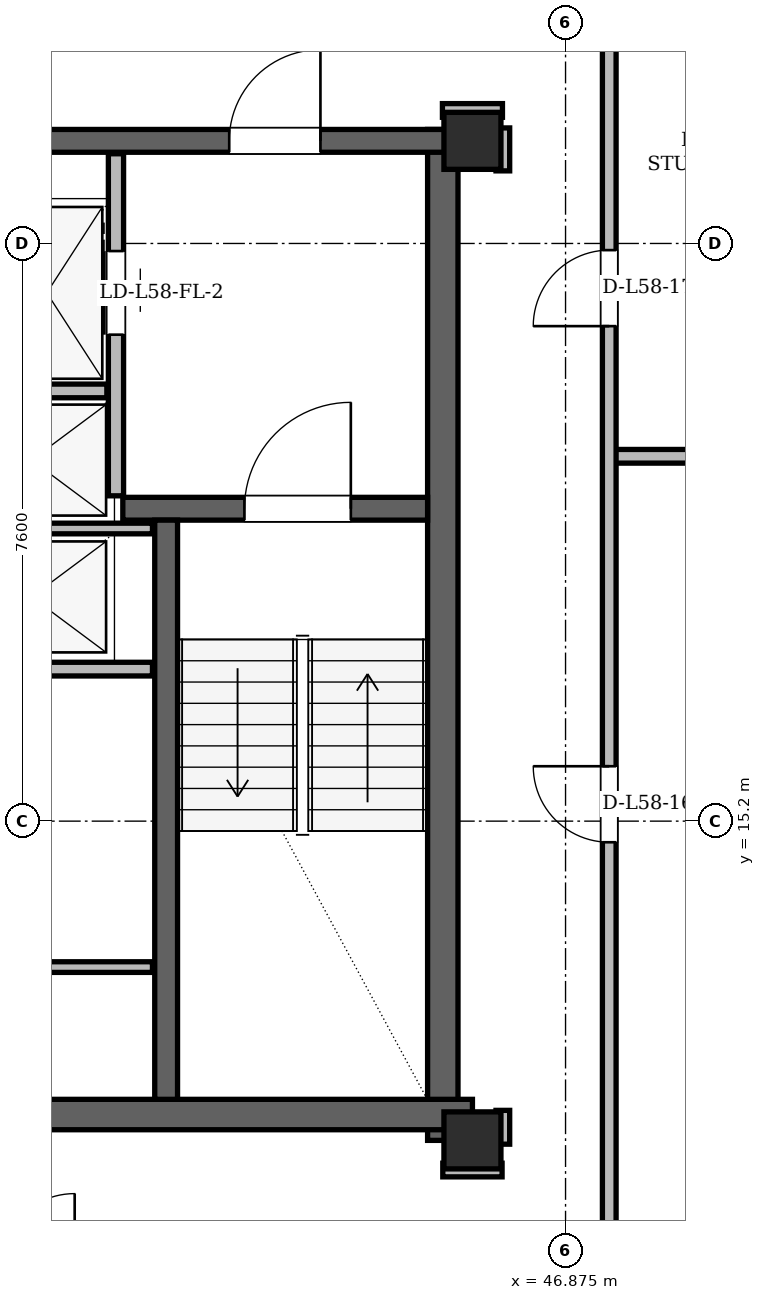
"""IFC4 building model, lengths in metres.
Left out: names, types, materials, properties, quantities, classifications, styles, units other than length and angle.
Written with IfcOpenShell. Run it as: python <this file> out.ifc"""

import sys

from ifc_helpers import new_model, si_unit, direction, frame, frame_2d, origin, origin_2d, place, context, subcontext, project, spatial, rectangle, hollow_rectangle, extrude, element, fill, save


model = new_model("IFC4")
c1 = context("Model", 3, precision=1e-05, world=origin(), true_north=direction((0.0, 1.0)))
c2 = subcontext(c1, "Body", "Model", "MODEL_VIEW")
j1 = project(units=[si_unit("LENGTHUNIT", "METRE"), si_unit("PLANEANGLEUNIT", "RADIAN")], contexts=[c1])
p1 = place(None, origin())
s1 = spatial("IfcSite", under=j1, at=p1, CompositionType="ELEMENT")
p2 = place(p1, origin())
s2 = spatial("IfcBuilding", under=s1, at=p2, CompositionType="ELEMENT")
p3 = place(p2, frame((0.0, 0.0, 219.9)))
s3 = spatial("IfcBuildingStorey", under=s2, at=p3, CompositionType="ELEMENT", Elevation=219.9)
for number, where, z_axis, x_axis in (
    (1, (45.65, 11.0, 0.0), (0.0, 0.0, 1.0), (1.0, 0.0, 0.0)),
    (2, (45.65, 24.15, 0.0), (0.0, 0.0, 1.0), (1.0, 0.0, 0.0)),
):
    element("IfcColumn", number, at=place(p3, frame(where, z_axis=z_axis, x_axis=x_axis)), inside=s3, PredefinedType="COLUMN", context=c2, shape_type="SweptSolid", body=[
        extrude(hollow_rectangle(XDim=0.75, YDim=0.75, WallThickness=0.06, at=origin_2d()), origin(), (0.0, 0.0, 1.0), 3.6),
    ])
p4 = place(p3, frame((45.26, 11.0, 0.0), z_axis=(0.0, 0.0, 1.0), x_axis=(0.0, 1.0, 0.0)))
e3 = element("IfcWall", 3, at=p4, inside=s3, PredefinedType="SHEAR", context=c2, shape_type="SweptSolid", body=[
    extrude(rectangle(XDim=13.3, YDim=0.4, at=frame_2d((6.65, 0.0))), origin(), (0.0, 0.0, 1.0), 3.38),
])
p5 = place(p3, frame((38.55, 11.34, 0.0), z_axis=(0.0, 0.0, 1.0), x_axis=(1.0, 0.0, 0.0)))
e4 = element("IfcWall", 4, at=p5, inside=s3, PredefinedType="SHEAR", context=c2, shape_type="SweptSolid", body=[
    extrude(rectangle(XDim=7.1, YDim=0.4, at=frame_2d((3.55, 0.0))), origin(), (0.0, 0.0, 1.0), 3.38),
])
p6 = place(p3, frame((29.65, 24.15, 0.0), z_axis=(0.0, 0.0, 1.0), x_axis=(1.0, 0.0, 0.0)))
e5 = element("IfcWall", 5, at=p6, inside=s3, PredefinedType="SHEAR", context=c2, shape_type="SweptSolid", body=[
    extrude(rectangle(XDim=15.7, YDim=0.3, at=frame_2d((7.85, 0.0))), origin(), (0.0, 0.0, 1.0), 3.38),
])
p7 = place(p6, frame((1.7, 0.0, 0.0)))
e6 = element("IfcOpeningElement", 6, at=p7, cuts=e5, PredefinedType="OPENING", context=c2, shape_type="SweptSolid", body=[
    extrude(rectangle(XDim=1.2, YDim=2.2, at=frame_2d((0.6, 1.1))), frame((0.0, 0.15, 0.0), z_axis=(0.0, -1.0, 0.0), x_axis=(1.0, 0.0, 0.0)), (0.0, 0.0, 1.0), 0.3),
])
p8 = place(p6, frame((12.8, 0.0, 0.0)))
e7 = element("IfcOpeningElement", 7, at=p8, cuts=e5, PredefinedType="OPENING", context=c2, shape_type="SweptSolid", body=[
    extrude(rectangle(XDim=1.2, YDim=2.2, at=frame_2d((0.6, 1.1))), frame((0.0, 0.15, 0.0), z_axis=(0.0, -1.0, 0.0), x_axis=(1.0, 0.0, 0.0)), (0.0, 0.0, 1.0), 0.3),
])
p9 = place(p6, frame((6.55, 0.0, 0.0)))
e8 = element("IfcOpeningElement", 8, at=p9, cuts=e5, PredefinedType="OPENING", context=c2, shape_type="SweptSolid", body=[
    extrude(rectangle(XDim=0.9, YDim=2.05, at=frame_2d((0.45, 1.025))), frame((0.0, 0.15, 0.0), z_axis=(0.0, -1.0, 0.0), x_axis=(1.0, 0.0, 0.0)), (0.0, 0.0, 1.0), 0.3),
])
p10 = place(p6, frame((8.45, 0.0, 0.0)))
e9 = element("IfcOpeningElement", 9, at=p10, cuts=e5, PredefinedType="OPENING", context=c2, shape_type="SweptSolid", body=[
    extrude(rectangle(XDim=0.9, YDim=2.05, at=frame_2d((0.45, 1.025))), frame((0.0, 0.15, 0.0), z_axis=(0.0, -1.0, 0.0), x_axis=(1.0, 0.0, 0.0)), (0.0, 0.0, 1.0), 0.3),
])
p11 = place(p3, frame((41.05, 19.31, 0.0), z_axis=(0.0, 0.0, 1.0), x_axis=(1.0, 0.0, 0.0)))
e10 = element("IfcWall", 10, at=p11, inside=s3, PredefinedType="SHEAR", context=c2, shape_type="SweptSolid", body=[
    extrude(rectangle(XDim=4.01, YDim=0.3, at=frame_2d((2.005, 0.0))), origin(), (0.0, 0.0, 1.0), 3.38),
])
p12 = place(p11, frame((1.6, 0.0, 0.0)))
e11 = element("IfcOpeningElement", 11, at=p12, cuts=e10, PredefinedType="OPENING", context=c2, shape_type="SweptSolid", body=[
    extrude(rectangle(XDim=1.4, YDim=2.2, at=frame_2d((0.7, 1.1))), frame((0.0, 0.15, 0.0), z_axis=(0.0, -1.0, 0.0), x_axis=(1.0, 0.0, 0.0)), (0.0, 0.0, 1.0), 0.3),
])
p13 = place(p3, frame((41.62, 11.54, 0.0), z_axis=(0.0, 0.0, 1.0), x_axis=(0.0, 1.0, 0.0)))
e12 = element("IfcWall", 12, at=p13, inside=s3, PredefinedType="SHEAR", context=c2, shape_type="SweptSolid", body=[
    extrude(rectangle(XDim=7.62, YDim=0.3, at=frame_2d((3.81, 0.0))), origin(), (0.0, 0.0, 1.0), 3.38),
])
p14 = place(p3, frame((59.113, 11.428, 0.0), z_axis=(0.0, 0.0, 1.0), x_axis=(-0.499994551211, 0.866028549621, 0.0)))
e13 = element("IfcWall", 13, at=p14, inside=s3, PredefinedType="SOLIDWALL", context=c2, shape_type="SweptSolid", body=[
    extrude(rectangle(XDim=36.634, YDim=0.29, at=frame_2d((18.317, 0.0))), origin(), (0.0, 0.0, 1.0), 2.677),
])
p15 = place(p14, frame((3.429, 0.0, 0.0)))
e14 = element("IfcOpeningElement", 14, at=p15, cuts=e13, PredefinedType="OPENING", context=c2, shape_type="SweptSolid", body=[
    extrude(rectangle(XDim=1.5, YDim=2.2, at=frame_2d((0.75, 1.1))), frame((0.0, 0.145, 0.0), z_axis=(0.0, -1.0, 0.0), x_axis=(1.0, 0.0, 0.0)), (0.0, 0.0, 1.0), 0.29),
])
p16 = place(p14, frame((27.099, 0.0, 0.0)))
e15 = element("IfcOpeningElement", 15, at=p16, cuts=e13, PredefinedType="OPENING", context=c2, shape_type="SweptSolid", body=[
    extrude(rectangle(XDim=1.5, YDim=2.2, at=frame_2d((0.75, 1.1))), frame((0.0, 0.145, 0.0), z_axis=(0.0, -1.0, 0.0), x_axis=(1.0, 0.0, 0.0)), (0.0, 0.0, 1.0), 0.29),
])
p17 = place(p14, frame((7.895, 0.0, 0.85)))
e16 = element("IfcOpeningElement", 16, at=p17, cuts=e13, PredefinedType="OPENING", context=c2, shape_type="SweptSolid", body=[
    extrude(rectangle(XDim=1.2, YDim=1.48, at=frame_2d((0.6, 0.74))), frame((0.0, 0.145, 0.0), z_axis=(0.0, -1.0, 0.0), x_axis=(1.0, 0.0, 0.0)), (0.0, 0.0, 1.0), 0.29),
])
p18 = place(p14, frame((1.262, 0.0, 0.85)))
e17 = element("IfcOpeningElement", 17, at=p18, cuts=e13, PredefinedType="OPENING", context=c2, shape_type="SweptSolid", body=[
    extrude(rectangle(XDim=1.2, YDim=1.48, at=frame_2d((0.6, 0.74))), frame((0.0, 0.145, 0.0), z_axis=(0.0, -1.0, 0.0), x_axis=(1.0, 0.0, 0.0)), (0.0, 0.0, 1.0), 0.29),
])
p19 = place(p14, frame((12.216, 0.0, 0.85)))
e18 = element("IfcOpeningElement", 18, at=p19, cuts=e13, PredefinedType="OPENING", context=c2, shape_type="SweptSolid", body=[
    extrude(rectangle(XDim=2.0, YDim=1.717, at=frame_2d((1.0, 0.858))), frame((0.0, 0.145, 0.0), z_axis=(0.0, -1.0, 0.0), x_axis=(1.0, 0.0, 0.0)), (0.0, 0.0, 1.0), 0.29),
])
p20 = place(p14, frame((17.285, 0.0, 0.85)))
e19 = element("IfcOpeningElement", 19, at=p20, cuts=e13, PredefinedType="OPENING", context=c2, shape_type="SweptSolid", body=[
    extrude(rectangle(XDim=1.4, YDim=1.6, at=frame_2d((0.7, 0.8))), frame((0.0, 0.145, 0.0), z_axis=(0.0, -1.0, 0.0), x_axis=(1.0, 0.0, 0.0)), (0.0, 0.0, 1.0), 0.29),
])
p21 = place(p14, frame((20.673, 0.0, 0.85)))
e20 = element("IfcOpeningElement", 20, at=p21, cuts=e13, PredefinedType="OPENING", context=c2, shape_type="SweptSolid", body=[
    extrude(rectangle(XDim=1.2, YDim=1.48, at=frame_2d((0.6, 0.74))), frame((0.0, 0.145, 0.0), z_axis=(0.0, -1.0, 0.0), x_axis=(1.0, 0.0, 0.0)), (0.0, 0.0, 1.0), 0.29),
])
p22 = place(p14, frame((34.257, 0.0, 0.85)))
e21 = element("IfcOpeningElement", 21, at=p22, cuts=e13, PredefinedType="OPENING", context=c2, shape_type="SweptSolid", body=[
    extrude(rectangle(XDim=1.2, YDim=1.48, at=frame_2d((0.6, 0.74))), frame((0.0, 0.145, 0.0), z_axis=(0.0, -1.0, 0.0), x_axis=(1.0, 0.0, 0.0)), (0.0, 0.0, 1.0), 0.29),
])
p23 = place(p3, frame((40.96, 19.48, 0.0), z_axis=(0.0, 0.0, 1.0), x_axis=(0.0, 1.0, 0.0)))
e22 = element("IfcWall", 22, at=p23, inside=s3, PredefinedType="PARTITIONING", context=c2, shape_type="SweptSolid", body=[
    extrude(rectangle(XDim=4.5, YDim=0.2, at=frame_2d((2.25, 0.0))), origin(), (0.0, 0.0, 1.0), 3.38),
])
p24 = place(p23, frame((2.12, 0.0, 0.0)))
e23 = element("IfcOpeningElement", 23, at=p24, cuts=e22, PredefinedType="OPENING", context=c2, shape_type="SweptSolid", body=[
    extrude(rectangle(XDim=1.1, YDim=2.2, at=frame_2d((0.55, 1.1))), frame((0.0, 0.1, 0.0), z_axis=(0.0, -1.0, 0.0), x_axis=(1.0, 0.0, 0.0)), (0.0, 0.0, 1.0), 0.2),
])
p25 = place(p3, frame((39.26, 20.86, 0.0), z_axis=(0.0, 0.0, 1.0), x_axis=(1.0, 0.0, 0.0)))
e24 = element("IfcWall", 24, at=p25, inside=s3, PredefinedType="PARTITIONING", context=c2, shape_type="SweptSolid", body=[
    extrude(rectangle(XDim=1.58, YDim=0.18, at=frame_2d((0.79, 0.0))), origin(), (0.0, 0.0, 1.0), 3.38),
])
p26 = place(p3, frame((38.78, 17.2, 0.0), z_axis=(0.0, 0.0, 1.0), x_axis=(1.0, 0.0, 0.0)))
e25 = element("IfcWall", 25, at=p26, inside=s3, PredefinedType="PARTITIONING", context=c2, shape_type="SweptSolid", body=[
    extrude(rectangle(XDim=2.66, YDim=0.18, at=frame_2d((1.33, 0.0))), origin(), (0.0, 0.0, 1.0), 3.38),
])
for number, where, z_axis, x_axis in (
    (26, (38.78, 19.05, 0.0), (0.0, 0.0, 1.0), (1.0, 0.0, 0.0)),
    (27, (38.78, 13.28, 0.0), (0.0, 0.0, 1.0), (1.0, 0.0, 0.0)),
):
    element("IfcWall", number, at=place(p3, frame(where, z_axis=z_axis, x_axis=x_axis)), inside=s3, PredefinedType="PARTITIONING", context=c2, shape_type="SweptSolid", body=[
        extrude(rectangle(XDim=2.66, YDim=0.14, at=frame_2d((1.33, 0.0))), origin(), (0.0, 0.0, 1.0), 3.38),
    ])
p27 = place(p3, frame((45.26, 10.61, 0.0), z_axis=(0.0, 0.0, 1.0), x_axis=(1.0, 0.0, 0.0)))
e28 = element("IfcWall", 28, at=p27, inside=s3, PredefinedType="PARTITIONING", context=c2, shape_type="SweptSolid", body=[
    extrude(rectangle(XDim=0.78, YDim=0.18, at=frame_2d((0.39, 0.0))), origin(), (0.0, 0.0, 1.0), 3.38),
])
p28 = place(p3, frame((47.45, 20.0, 0.0), z_axis=(0.0, 0.0, 1.0), x_axis=(1.0, 0.0, 0.0)))
e29 = element("IfcWall", 29, at=p28, inside=s3, PredefinedType="PARTITIONING", context=c2, shape_type="SweptSolid", body=[
    extrude(rectangle(XDim=6.542, YDim=0.18, at=frame_2d((3.271, 0.0))), origin(), (0.0, 0.0, 1.0), 3.38),
])
p29 = place(p3, frame((45.255, 24.55, 0.0), z_axis=(0.0, 0.0, 1.0), x_axis=(1.0, 0.0, 0.0)))
e30 = element("IfcWall", 30, at=p29, inside=s3, PredefinedType="PARTITIONING", context=c2, shape_type="SweptSolid", body=[
    extrude(rectangle(XDim=0.79, YDim=0.18, at=frame_2d((0.395, 0.0))), origin(), (0.0, 0.0, 1.0), 2.913),
])
p30 = place(p3, frame((46.05, 10.95, 0.0), z_axis=(0.0, 0.0, 1.0), x_axis=(0.0, 1.0, 0.0)))
e31 = element("IfcWall", 31, at=p30, inside=s3, PredefinedType="PARTITIONING", context=c2, shape_type="SweptSolid", body=[
    extrude(rectangle(XDim=0.445, YDim=0.18, at=frame_2d((0.223, 0.0))), origin(), (0.0, 0.0, 1.0), 2.913),
])
p31 = place(p3, frame((46.05, 23.755, 0.0), z_axis=(0.0, 0.0, 1.0), x_axis=(0.0, 1.0, 0.0)))
e32 = element("IfcWall", 32, at=p31, inside=s3, PredefinedType="PARTITIONING", context=c2, shape_type="SweptSolid", body=[
    extrude(rectangle(XDim=0.565, YDim=0.18, at=frame_2d((0.283, 0.0))), origin(), (0.0, 0.0, 1.0), 3.38),
])
p32 = place(p3, frame((47.45, 5.867, 0.0), z_axis=(0.0, 0.0, 1.0), x_axis=(0.0, 1.0, 0.0)))
e33 = element("IfcWall", 33, at=p32, inside=s3, PredefinedType="PARTITIONING", context=c2, shape_type="SweptSolid", body=[
    extrude(rectangle(XDim=25.465, YDim=0.18, at=frame_2d((12.732, 0.0))), origin(), (0.0, 0.0, 1.0), 2.913),
])
p33 = place(p32, frame((9.055, 0.0, 0.0)))
e34 = element("IfcOpeningElement", 34, at=p33, cuts=e33, PredefinedType="OPENING", context=c2, shape_type="SweptSolid", body=[
    extrude(rectangle(XDim=1.0, YDim=2.18, at=frame_2d((0.5, 1.09))), frame((0.0, 0.09, 0.0), z_axis=(0.0, -1.0, 0.0), x_axis=(1.0, 0.0, 0.0)), (0.0, 0.0, 1.0), 0.18),
])
p34 = place(p32, frame((15.845, 0.0, 0.0)))
e35 = element("IfcOpeningElement", 35, at=p34, cuts=e33, PredefinedType="OPENING", context=c2, shape_type="SweptSolid", body=[
    extrude(rectangle(XDim=1.0, YDim=2.18, at=frame_2d((0.5, 1.09))), frame((0.0, 0.09, 0.0), z_axis=(0.0, -1.0, 0.0), x_axis=(1.0, 0.0, 0.0)), (0.0, 0.0, 1.0), 0.18),
])
p35 = place(p24, origin())
e36 = element("IfcDoor", 36, at=p35, inside=s3, OperationType="SLIDING_TO_RIGHT", PredefinedType="DOOR", context=c2, shape_type="SweptSolid", body=[
    extrude(rectangle(XDim=1.1, YDim=2.2, at=frame_2d((0.55, 1.1))), frame((0.0, 0.025, 0.0), z_axis=(0.0, -1.0, 0.0), x_axis=(1.0, 0.0, 0.0)), (0.0, 0.0, 1.0), 0.05),
])
fill(e23, e36)
p36 = place(p12, origin())
e37 = element("IfcDoor", 37, at=p36, inside=s3, OperationType="SINGLE_SWING_RIGHT", PredefinedType="DOOR", context=c2, shape_type="SweptSolid", body=[
    extrude(rectangle(XDim=1.4, YDim=2.2, at=frame_2d((0.7, 1.1))), frame((0.0, 0.025, 0.0), z_axis=(0.0, -1.0, 0.0), x_axis=(1.0, 0.0, 0.0)), (0.0, 0.0, 1.0), 0.05),
])
fill(e11, e37)
p37 = place(p8, origin())
e38 = element("IfcDoor", 38, at=p37, inside=s3, OperationType="SINGLE_SWING_RIGHT", PredefinedType="DOOR", context=c2, shape_type="SweptSolid", body=[
    extrude(rectangle(XDim=1.2, YDim=2.2, at=frame_2d((0.6, 1.1))), frame((0.0, 0.025, 0.0), z_axis=(0.0, -1.0, 0.0), x_axis=(1.0, 0.0, 0.0)), (0.0, 0.0, 1.0), 0.05),
])
fill(e7, e38)
p38 = place(p33, origin())
e39 = element("IfcDoor", 39, at=p38, inside=s3, OperationType="SINGLE_SWING_RIGHT", PredefinedType="DOOR", context=c2, shape_type="SweptSolid", body=[
    extrude(rectangle(XDim=1.0, YDim=2.18, at=frame_2d((0.5, 1.09))), frame((0.0, 0.025, 0.0), z_axis=(0.0, -1.0, 0.0), x_axis=(1.0, 0.0, 0.0)), (0.0, 0.0, 1.0), 0.05),
])
fill(e34, e39)
p39 = place(p34, origin())
e40 = element("IfcDoor", 40, at=p39, inside=s3, OperationType="SINGLE_SWING_LEFT", PredefinedType="DOOR", context=c2, shape_type="SweptSolid", body=[
    extrude(rectangle(XDim=1.0, YDim=2.18, at=frame_2d((0.5, 1.09))), frame((0.0, 0.025, 0.0), z_axis=(0.0, -1.0, 0.0), x_axis=(1.0, 0.0, 0.0)), (0.0, 0.0, 1.0), 0.05),
])
fill(e35, e40)
save(model, sys.argv[1])
